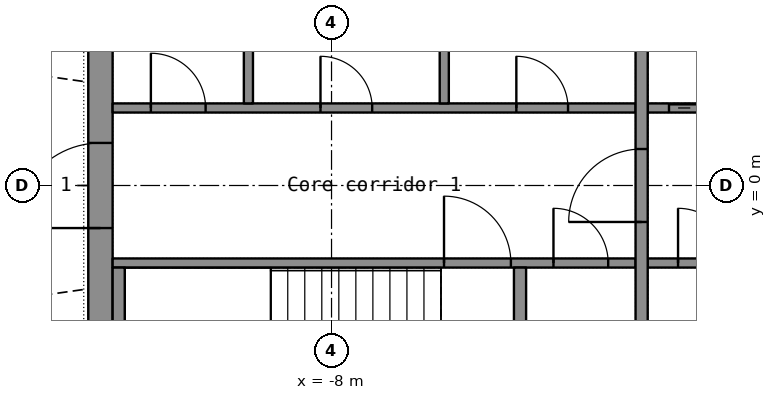
"""IFC4 building model, lengths in metres.
Left out: names, types, materials, properties, quantities, classifications, styles, units other than length and angle.
Written with IfcOpenShell. Run it as: python <this file> out.ifc"""

import sys

from ifc_helpers import new_model, si_unit, direction, frame, frame_2d, origin, place, context, subcontext, project, spatial, rectangle, extrude, element, fill, save


model = new_model("IFC4")
c1 = context("Model", 3, precision=1e-05, world=origin(), true_north=direction((0.0, 1.0)))
c2 = subcontext(c1, "Body", "Model", "MODEL_VIEW")
j1 = project(units=[si_unit("LENGTHUNIT", "METRE"), si_unit("PLANEANGLEUNIT", "RADIAN")], contexts=[c1])
p1 = place(None, origin())
s1 = spatial("IfcSite", under=j1, at=p1, CompositionType="ELEMENT")
p2 = place(p1, origin())
s2 = spatial("IfcBuilding", under=s1, at=p2, CompositionType="ELEMENT")
p3 = place(p2, frame((0.0, 0.0, 250.4)))
s3 = spatial("IfcBuildingStorey", under=s2, at=p3, CompositionType="ELEMENT", Elevation=250.4)
p4 = place(p3, frame((-11.8, -7.2, 0.0), z_axis=(0.0, 0.0, 1.0), x_axis=(0.0, 1.0, 0.0)))
e1 = element("IfcWall", 1, at=p4, inside=s3, PredefinedType="SHEAR", context=c2, shape_type="SweptSolid", body=[
    extrude(rectangle(XDim=14.4, YDim=0.4, at=frame_2d((7.2, 0.0))), origin(), (0.0, 0.0, 1.0), 3.3),
])
p5 = place(p4, frame((6.5, 0.0, 0.0)))
e2 = element("IfcOpeningElement", 2, at=p5, cuts=e1, PredefinedType="OPENING", context=c2, shape_type="SweptSolid", body=[
    extrude(rectangle(XDim=1.4, YDim=2.2, at=frame_2d((0.7, 1.1))), frame((0.0, 0.21, 0.0), z_axis=(0.0, -1.0, 0.0), x_axis=(1.0, 0.0, 0.0)), (0.0, 0.0, 1.0), 0.42),
])
p6 = place(p3, frame((-11.6, -1.275, 0.0), z_axis=(0.0, 0.0, 1.0), x_axis=(1.0, 0.0, 0.0)))
e3 = element("IfcWall", 3, at=p6, inside=s3, PredefinedType="SHEAR", context=c2, shape_type="SweptSolid", body=[
    extrude(rectangle(XDim=8.6, YDim=0.15, at=frame_2d((4.3, 0.0))), origin(), (0.0, 0.0, 1.0), 3.3),
])
p7 = place(p6, frame((5.45, 0.0, 0.0)))
e4 = element("IfcOpeningElement", 4, at=p7, cuts=e3, PredefinedType="OPENING", context=c2, shape_type="SweptSolid", body=[
    extrude(rectangle(XDim=1.1, YDim=2.15, at=frame_2d((0.55, 1.075))), frame((0.0, 0.085, 0.0), z_axis=(0.0, -1.0, 0.0), x_axis=(1.0, 0.0, 0.0)), (0.0, 0.0, 1.0), 0.17),
])
p8 = place(p6, frame((7.25, 0.0, 0.0)))
e5 = element("IfcOpeningElement", 5, at=p8, cuts=e3, PredefinedType="OPENING", context=c2, shape_type="SweptSolid", body=[
    extrude(rectangle(XDim=0.9, YDim=2.1, at=frame_2d((0.45, 1.05))), frame((0.0, 0.085, 0.0), z_axis=(0.0, -1.0, 0.0), x_axis=(1.0, 0.0, 0.0)), (0.0, 0.0, 1.0), 0.17),
])
p9 = place(p3, frame((-2.8, -1.275, 0.0), z_axis=(0.0, 0.0, 1.0), x_axis=(1.0, 0.0, 0.0)))
e6 = element("IfcWall", 6, at=p9, inside=s3, PredefinedType="SHEAR", context=c2, shape_type="SweptSolid", body=[
    extrude(rectangle(XDim=5.6, YDim=0.15, at=frame_2d((2.8, 0.0))), origin(), (0.0, 0.0, 1.0), 3.3),
])
p10 = place(p9, frame((4.15, 0.0, 0.0)))
e7 = element("IfcOpeningElement", 7, at=p10, cuts=e6, PredefinedType="OPENING", context=c2, shape_type="SweptSolid", body=[
    extrude(rectangle(XDim=1.1, YDim=2.2, at=frame_2d((0.55, 1.1))), frame((0.0, 0.085, 0.0), z_axis=(0.0, -1.0, 0.0), x_axis=(1.0, 0.0, 0.0)), (0.0, 0.0, 1.0), 0.17),
])
p11 = place(p9, frame((0.499, 0.0, 0.0)))
e8 = element("IfcOpeningElement", 8, at=p11, cuts=e6, PredefinedType="OPENING", context=c2, shape_type="SweptSolid", body=[
    extrude(rectangle(XDim=0.9, YDim=2.1, at=frame_2d((0.45, 1.05))), frame((0.0, 0.085, 0.0), z_axis=(0.0, -1.0, 0.0), x_axis=(1.0, 0.0, 0.0)), (0.0, 0.0, 1.0), 0.17),
])
p12 = place(p9, frame((2.374, 0.0, 0.0)))
e9 = element("IfcOpeningElement", 9, at=p12, cuts=e6, PredefinedType="OPENING", context=c2, shape_type="SweptSolid", body=[
    extrude(rectangle(XDim=0.9, YDim=2.1, at=frame_2d((0.45, 1.05))), frame((0.0, 0.085, 0.0), z_axis=(0.0, -1.0, 0.0), x_axis=(1.0, 0.0, 0.0)), (0.0, 0.0, 1.0), 0.17),
])
p13 = place(p3, frame((-11.6, 1.275, 0.0), z_axis=(0.0, 0.0, 1.0), x_axis=(1.0, 0.0, 0.0)))
e10 = element("IfcWall", 10, at=p13, inside=s3, PredefinedType="PARTITIONING", context=c2, shape_type="SweptSolid", body=[
    extrude(rectangle(XDim=8.6, YDim=0.15, at=frame_2d((4.3, 0.0))), origin(), (0.0, 0.0, 1.0), 3.3),
])
p14 = place(p13, frame((0.629, 0.0, 0.0)))
e11 = element("IfcOpeningElement", 11, at=p14, cuts=e10, PredefinedType="OPENING", context=c2, shape_type="SweptSolid", body=[
    extrude(rectangle(XDim=0.9, YDim=2.1, at=frame_2d((0.45, 1.05))), frame((0.0, 0.085, 0.0), z_axis=(0.0, -1.0, 0.0), x_axis=(1.0, 0.0, 0.0)), (0.0, 0.0, 1.0), 0.17),
])
p15 = place(p13, frame((3.418, 0.0, 0.0)))
e12 = element("IfcOpeningElement", 12, at=p15, cuts=e10, PredefinedType="OPENING", context=c2, shape_type="SweptSolid", body=[
    extrude(rectangle(XDim=0.85, YDim=2.1, at=frame_2d((0.425, 1.05))), frame((0.0, 0.085, 0.0), z_axis=(0.0, -1.0, 0.0), x_axis=(1.0, 0.0, 0.0)), (0.0, 0.0, 1.0), 0.17),
])
p16 = place(p13, frame((6.639, 0.0, 0.0)))
e13 = element("IfcOpeningElement", 13, at=p16, cuts=e10, PredefinedType="OPENING", context=c2, shape_type="SweptSolid", body=[
    extrude(rectangle(XDim=0.85, YDim=2.1, at=frame_2d((0.425, 1.05))), frame((0.0, 0.085, 0.0), z_axis=(0.0, -1.0, 0.0), x_axis=(1.0, 0.0, 0.0)), (0.0, 0.0, 1.0), 0.17),
])
p17 = place(p3, frame((-2.8, 1.275, 0.0), z_axis=(0.0, 0.0, 1.0), x_axis=(1.0, 0.0, 0.0)))
e14 = element("IfcWall", 14, at=p17, inside=s3, PredefinedType="SHEAR", context=c2, shape_type="SweptSolid", body=[
    extrude(rectangle(XDim=5.6, YDim=0.15, at=frame_2d((2.8, 0.0))), origin(), (0.0, 0.0, 1.0), 3.3),
])
p18 = place(p17, frame((0.35, 0.0, 0.0)))
e15 = element("IfcOpeningElement", 15, at=p18, cuts=e14, PredefinedType="OPENING", context=c2, shape_type="SweptSolid", body=[
    extrude(rectangle(XDim=1.1, YDim=2.2, at=frame_2d((0.55, 1.1))), frame((0.0, 0.085, 0.0), z_axis=(0.0, -1.0, 0.0), x_axis=(1.0, 0.0, 0.0)), (0.0, 0.0, 1.0), 0.17),
])
p19 = place(p17, frame((2.413, 0.0, 0.0)))
e16 = element("IfcOpeningElement", 16, at=p19, cuts=e14, PredefinedType="OPENING", context=c2, shape_type="SweptSolid", body=[
    extrude(rectangle(XDim=0.9, YDim=2.1, at=frame_2d((0.45, 1.05))), frame((0.0, 0.085, 0.0), z_axis=(0.0, -1.0, 0.0), x_axis=(1.0, 0.0, 0.0)), (0.0, 0.0, 1.0), 0.17),
])
p20 = place(p17, frame((4.288, 0.0, 0.0)))
e17 = element("IfcOpeningElement", 17, at=p20, cuts=e14, PredefinedType="OPENING", context=c2, shape_type="SweptSolid", body=[
    extrude(rectangle(XDim=0.9, YDim=2.1, at=frame_2d((0.45, 1.05))), frame((0.0, 0.085, 0.0), z_axis=(0.0, -1.0, 0.0), x_axis=(1.0, 0.0, 0.0)), (0.0, 0.0, 1.0), 0.17),
])
p21 = place(p3, frame((-2.9, -3.7, 0.0), z_axis=(0.0, 0.0, 1.0), x_axis=(0.0, 1.0, 0.0)))
e18 = element("IfcWall", 18, at=p21, inside=s3, PredefinedType="SHEAR", context=c2, shape_type="SweptSolid", body=[
    extrude(rectangle(XDim=7.4, YDim=0.2, at=frame_2d((3.7, 0.0))), origin(), (0.0, 0.0, 1.0), 3.3),
])
p22 = place(p21, frame((3.1, 0.0, 0.0)))
e19 = element("IfcOpeningElement", 19, at=p22, cuts=e18, PredefinedType="OPENING", context=c2, shape_type="SweptSolid", body=[
    extrude(rectangle(XDim=1.2, YDim=2.2, at=frame_2d((0.6, 1.1))), frame((0.0, 0.11, 0.0), z_axis=(0.0, -1.0, 0.0), x_axis=(1.0, 0.0, 0.0)), (0.0, 0.0, 1.0), 0.22),
])
for number, where, z_axis, x_axis in (
    (20, (-11.5, -3.7, 0.0), (0.0, 0.0, 1.0), (0.0, 1.0, 0.0)),
    (21, (-4.9, -3.7, 0.0), (0.0, 0.0, 1.0), (0.0, 1.0, 0.0)),
):
    element("IfcWall", number, at=place(p3, frame(where, z_axis=z_axis, x_axis=x_axis)), inside=s3, PredefinedType="SHEAR", context=c2, shape_type="SweptSolid", body=[
        extrude(rectangle(XDim=2.35, YDim=0.2, at=frame_2d((1.175, 0.0))), origin(), (0.0, 0.0, 1.0), 3.3),
    ])
for number, where, z_axis, x_axis in (
    (22, (-9.367, 1.35, 0.0), (0.0, 0.0, 1.0), (0.0, 1.0, 0.0)),
    (23, (-6.146, 1.35, 0.0), (0.0, 0.0, 1.0), (0.0, 1.0, 0.0)),
):
    element("IfcWall", number, at=place(p3, frame(where, z_axis=z_axis, x_axis=x_axis)), inside=s3, PredefinedType="PARTITIONING", context=c2, shape_type="SweptSolid", body=[
        extrude(rectangle(XDim=2.35, YDim=0.15, at=frame_2d((1.175, 0.0))), origin(), (0.0, 0.0, 1.0), 3.3),
    ])
p23 = place(p5, origin())
e24 = element("IfcDoor", 24, at=p23, inside=s3, OperationType="DOUBLE_DOOR_SINGLE_SWING", PredefinedType="DOOR", context=c2, shape_type="SweptSolid", body=[
    extrude(rectangle(XDim=1.4, YDim=2.2, at=frame_2d((0.7, 1.1))), frame((0.0, 0.025, 0.0), z_axis=(0.0, -1.0, 0.0), x_axis=(1.0, 0.0, 0.0)), (0.0, 0.0, 1.0), 0.05),
])
fill(e2, e24)
p24 = place(p22, origin())
e25 = element("IfcDoor", 25, at=p24, inside=s3, OperationType="SINGLE_SWING_LEFT", PredefinedType="DOOR", context=c2, shape_type="SweptSolid", body=[
    extrude(rectangle(XDim=1.2, YDim=2.2, at=frame_2d((0.6, 1.1))), frame((0.0, 0.025, 0.0), z_axis=(0.0, -1.0, 0.0), x_axis=(1.0, 0.0, 0.0)), (0.0, 0.0, 1.0), 0.05),
])
fill(e19, e25)
p25 = place(p18, origin())
e26 = element("IfcDoor", 26, at=p25, inside=s3, OperationType="DOUBLE_DOOR_SLIDING", PredefinedType="DOOR", context=c2, shape_type="SweptSolid", body=[
    extrude(rectangle(XDim=1.1, YDim=2.2, at=frame_2d((0.55, 1.1))), frame((0.0, 0.025, 0.0), z_axis=(0.0, -1.0, 0.0), x_axis=(1.0, 0.0, 0.0)), (0.0, 0.0, 1.0), 0.05),
])
fill(e15, e26)
p26 = place(p7, origin())
e27 = element("IfcDoor", 27, at=p26, inside=s3, OperationType="SINGLE_SWING_LEFT", PredefinedType="DOOR", context=c2, shape_type="SweptSolid", body=[
    extrude(rectangle(XDim=1.1, YDim=2.15, at=frame_2d((0.55, 1.075))), frame((0.0, 0.025, 0.0), z_axis=(0.0, -1.0, 0.0), x_axis=(1.0, 0.0, 0.0)), (0.0, 0.0, 1.0), 0.05),
])
fill(e4, e27)
p27 = place(p14, origin())
e28 = element("IfcDoor", 28, at=p27, inside=s3, OperationType="SINGLE_SWING_LEFT", PredefinedType="DOOR", context=c2, shape_type="SweptSolid", body=[
    extrude(rectangle(XDim=0.9, YDim=2.1, at=frame_2d((0.45, 1.05))), frame((0.0, 0.025, 0.0), z_axis=(0.0, -1.0, 0.0), x_axis=(1.0, 0.0, 0.0)), (0.0, 0.0, 1.0), 0.05),
])
fill(e11, e28)
p28 = place(p15, origin())
e29 = element("IfcDoor", 29, at=p28, inside=s3, OperationType="SINGLE_SWING_LEFT", PredefinedType="DOOR", context=c2, shape_type="SweptSolid", body=[
    extrude(rectangle(XDim=0.85, YDim=2.1, at=frame_2d((0.425, 1.05))), frame((0.0, 0.025, 0.0), z_axis=(0.0, -1.0, 0.0), x_axis=(1.0, 0.0, 0.0)), (0.0, 0.0, 1.0), 0.05),
])
fill(e12, e29)
p29 = place(p16, origin())
e30 = element("IfcDoor", 30, at=p29, inside=s3, OperationType="SINGLE_SWING_LEFT", PredefinedType="DOOR", context=c2, shape_type="SweptSolid", body=[
    extrude(rectangle(XDim=0.85, YDim=2.1, at=frame_2d((0.425, 1.05))), frame((0.0, 0.025, 0.0), z_axis=(0.0, -1.0, 0.0), x_axis=(1.0, 0.0, 0.0)), (0.0, 0.0, 1.0), 0.05),
])
fill(e13, e30)
p30 = place(p11, origin())
e31 = element("IfcDoor", 31, at=p30, inside=s3, OperationType="SINGLE_SWING_LEFT", PredefinedType="DOOR", context=c2, shape_type="SweptSolid", body=[
    extrude(rectangle(XDim=0.9, YDim=2.1, at=frame_2d((0.45, 1.05))), frame((0.0, 0.025, 0.0), z_axis=(0.0, -1.0, 0.0), x_axis=(1.0, 0.0, 0.0)), (0.0, 0.0, 1.0), 0.05),
])
fill(e8, e31)
p31 = place(p8, origin())
e32 = element("IfcDoor", 32, at=p31, inside=s3, OperationType="SINGLE_SWING_LEFT", PredefinedType="DOOR", context=c2, shape_type="SweptSolid", body=[
    extrude(rectangle(XDim=0.9, YDim=2.1, at=frame_2d((0.45, 1.05))), frame((0.0, 0.025, 0.0), z_axis=(0.0, -1.0, 0.0), x_axis=(1.0, 0.0, 0.0)), (0.0, 0.0, 1.0), 0.05),
])
fill(e5, e32)
save(model, sys.argv[1])
